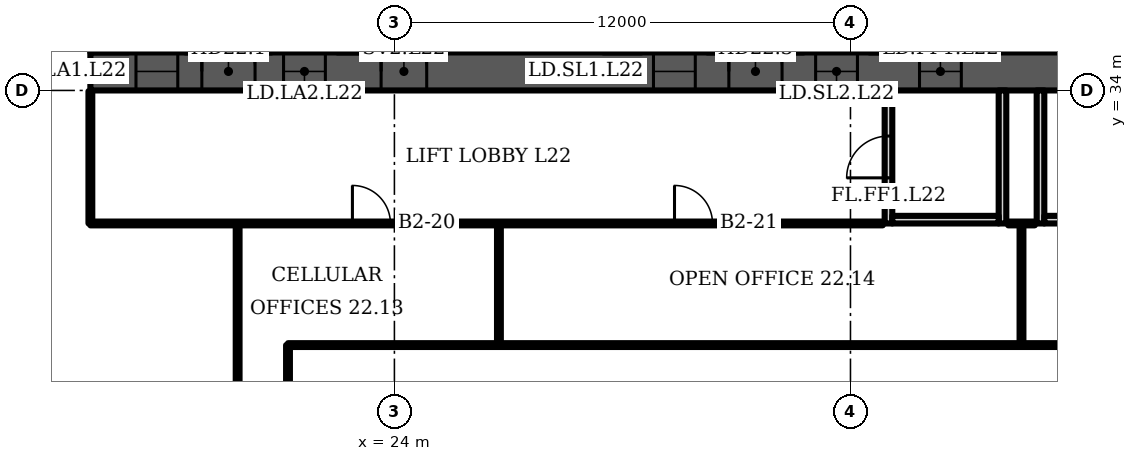
"""IFC4 building model, lengths in metres.
Left out: names, types, materials, properties, quantities, classifications, styles, units other than length and angle.
Written with IfcOpenShell. Run it as: python <this file> out.ifc"""

import sys

from ifc_helpers import new_model, si_unit, direction, frame, frame_2d, origin, place, context, subcontext, project, spatial, rectangle, extrude, element, fill, save


model = new_model("IFC4")
c1 = context("Model", 3, precision=1e-05, world=origin(), true_north=direction((0.0, 1.0)))
c2 = subcontext(c1, "Body", "Model", "MODEL_VIEW")
j1 = project(units=[si_unit("LENGTHUNIT", "METRE"), si_unit("PLANEANGLEUNIT", "RADIAN")], contexts=[c1])
p1 = place(None, origin())
s1 = spatial("IfcSite", under=j1, at=p1, CompositionType="ELEMENT")
p2 = place(p1, origin())
s2 = spatial("IfcBuilding", under=s1, at=p2, CompositionType="ELEMENT")
p3 = place(p2, frame((0.0, 0.0, 100.3)))
s3 = spatial("IfcBuildingStorey", under=s2, at=p3, CompositionType="ELEMENT", Elevation=100.3)
p4 = place(p3, frame((16.0, 34.5, 0.0), z_axis=(0.0, 0.0, 1.0), x_axis=(1.0, 0.0, 0.0)))
e1 = element("IfcWall", 1, at=p4, inside=s3, PredefinedType="SHEAR", context=c2, shape_type="SweptSolid", body=[
    extrude(rectangle(XDim=49.0, YDim=1.0, at=frame_2d((24.5, 0.0))), origin(), (0.0, 0.0, 1.0), 3.6),
])
p5 = place(p4, frame((1.2, 0.0, 0.0)))
e2 = element("IfcOpeningElement", 2, at=p5, cuts=e1, PredefinedType="OPENING", context=c2, shape_type="SweptSolid", body=[
    extrude(rectangle(XDim=1.1, YDim=2.1, at=frame_2d((0.55, 1.05))), frame((0.0, 0.51, 0.0), z_axis=(0.0, -1.0, 0.0), x_axis=(1.0, 0.0, 0.0)), (0.0, 0.0, 1.0), 1.02),
])
p6 = place(p4, frame((5.083, 0.0, 0.0)))
e3 = element("IfcOpeningElement", 3, at=p6, cuts=e1, PredefinedType="OPENING", context=c2, shape_type="SweptSolid", body=[
    extrude(rectangle(XDim=1.1, YDim=2.1, at=frame_2d((0.55, 1.05))), frame((0.0, 0.51, 0.0), z_axis=(0.0, -1.0, 0.0), x_axis=(1.0, 0.0, 0.0)), (0.0, 0.0, 1.0), 1.02),
])
p7 = place(p4, frame((2.933, 0.0, 0.0)))
e4 = element("IfcOpeningElement", 4, at=p7, cuts=e1, PredefinedType="OPENING", context=c2, shape_type="SweptSolid", body=[
    extrude(rectangle(XDim=1.4, YDim=2.1, at=frame_2d((0.7, 1.05))), frame((0.0, 0.51, 0.0), z_axis=(0.0, -1.0, 0.0), x_axis=(1.0, 0.0, 0.0)), (0.0, 0.0, 1.0), 1.02),
])
p8 = place(p4, frame((7.65, 0.0, 0.0)))
e5 = element("IfcOpeningElement", 5, at=p8, cuts=e1, PredefinedType="OPENING", context=c2, shape_type="SweptSolid", body=[
    extrude(rectangle(XDim=1.2, YDim=2.1, at=frame_2d((0.6, 1.05))), frame((0.0, 0.51, 0.0), z_axis=(0.0, -1.0, 0.0), x_axis=(1.0, 0.0, 0.0)), (0.0, 0.0, 1.0), 1.02),
])
p9 = place(p4, frame((14.817, 0.0, 0.0)))
e6 = element("IfcOpeningElement", 6, at=p9, cuts=e1, PredefinedType="OPENING", context=c2, shape_type="SweptSolid", body=[
    extrude(rectangle(XDim=1.1, YDim=2.1, at=frame_2d((0.55, 1.05))), frame((0.0, 0.51, 0.0), z_axis=(0.0, -1.0, 0.0), x_axis=(1.0, 0.0, 0.0)), (0.0, 0.0, 1.0), 1.02),
])
p10 = place(p4, frame((19.083, 0.0, 0.0)))
e7 = element("IfcOpeningElement", 7, at=p10, cuts=e1, PredefinedType="OPENING", context=c2, shape_type="SweptSolid", body=[
    extrude(rectangle(XDim=1.1, YDim=2.1, at=frame_2d((0.55, 1.05))), frame((0.0, 0.51, 0.0), z_axis=(0.0, -1.0, 0.0), x_axis=(1.0, 0.0, 0.0)), (0.0, 0.0, 1.0), 1.02),
])
p11 = place(p4, frame((16.8, 0.0, 0.0)))
e8 = element("IfcOpeningElement", 8, at=p11, cuts=e1, PredefinedType="OPENING", context=c2, shape_type="SweptSolid", body=[
    extrude(rectangle(XDim=1.4, YDim=2.1, at=frame_2d((0.7, 1.05))), frame((0.0, 0.51, 0.0), z_axis=(0.0, -1.0, 0.0), x_axis=(1.0, 0.0, 0.0)), (0.0, 0.0, 1.0), 1.02),
])
p12 = place(p4, frame((21.817, 0.0, 0.0)))
e9 = element("IfcOpeningElement", 9, at=p12, cuts=e1, PredefinedType="OPENING", context=c2, shape_type="SweptSolid", body=[
    extrude(rectangle(XDim=1.1, YDim=2.1, at=frame_2d((0.55, 1.05))), frame((0.0, 0.51, 0.0), z_axis=(0.0, -1.0, 0.0), x_axis=(1.0, 0.0, 0.0)), (0.0, 0.0, 1.0), 1.02),
])
p13 = place(p4, frame((26.083, 0.0, 0.0)))
e10 = element("IfcOpeningElement", 10, at=p13, cuts=e1, PredefinedType="OPENING", context=c2, shape_type="SweptSolid", body=[
    extrude(rectangle(XDim=1.1, YDim=2.1, at=frame_2d((0.55, 1.05))), frame((0.0, 0.51, 0.0), z_axis=(0.0, -1.0, 0.0), x_axis=(1.0, 0.0, 0.0)), (0.0, 0.0, 1.0), 1.02),
])
p14 = place(p4, frame((33.15, 0.0, 0.0)))
e11 = element("IfcOpeningElement", 11, at=p14, cuts=e1, PredefinedType="OPENING", context=c2, shape_type="SweptSolid", body=[
    extrude(rectangle(XDim=1.2, YDim=2.1, at=frame_2d((0.6, 1.05))), frame((0.0, 0.51, 0.0), z_axis=(0.0, -1.0, 0.0), x_axis=(1.0, 0.0, 0.0)), (0.0, 0.0, 1.0), 1.02),
])
p15 = place(p4, frame((37.8, 0.0, 0.0)))
e12 = element("IfcOpeningElement", 12, at=p15, cuts=e1, PredefinedType="OPENING", context=c2, shape_type="SweptSolid", body=[
    extrude(rectangle(XDim=1.4, YDim=2.1, at=frame_2d((0.7, 1.05))), frame((0.0, 0.51, 0.0), z_axis=(0.0, -1.0, 0.0), x_axis=(1.0, 0.0, 0.0)), (0.0, 0.0, 1.0), 1.02),
])
p16 = place(p4, frame((42.817, 0.0, 0.0)))
e13 = element("IfcOpeningElement", 13, at=p16, cuts=e1, PredefinedType="OPENING", context=c2, shape_type="SweptSolid", body=[
    extrude(rectangle(XDim=1.1, YDim=2.1, at=frame_2d((0.55, 1.05))), frame((0.0, 0.51, 0.0), z_axis=(0.0, -1.0, 0.0), x_axis=(1.0, 0.0, 0.0)), (0.0, 0.0, 1.0), 1.02),
])
p17 = place(p4, frame((46.7, 0.0, 0.0)))
e14 = element("IfcOpeningElement", 14, at=p17, cuts=e1, PredefinedType="OPENING", context=c2, shape_type="SweptSolid", body=[
    extrude(rectangle(XDim=1.1, YDim=2.1, at=frame_2d((0.55, 1.05))), frame((0.0, 0.51, 0.0), z_axis=(0.0, -1.0, 0.0), x_axis=(1.0, 0.0, 0.0)), (0.0, 0.0, 1.0), 1.02),
])
p18 = place(p4, frame((44.667, 0.0, 0.0)))
e15 = element("IfcOpeningElement", 15, at=p18, cuts=e1, PredefinedType="OPENING", context=c2, shape_type="SweptSolid", body=[
    extrude(rectangle(XDim=1.4, YDim=2.1, at=frame_2d((0.7, 1.05))), frame((0.0, 0.51, 0.0), z_axis=(0.0, -1.0, 0.0), x_axis=(1.0, 0.0, 0.0)), (0.0, 0.0, 1.0), 1.02),
])
p19 = place(p3, frame((37.0, 30.5, 0.0), z_axis=(0.0, 0.0, 1.0), x_axis=(0.0, 1.0, 0.0)))
e16 = element("IfcWall", 16, at=p19, inside=s3, PredefinedType="PARTITIONING", context=c2, shape_type="SweptSolid", body=[
    extrude(rectangle(XDim=3.5, YDim=0.2, at=frame_2d((1.75, 0.0))), origin(), (0.0, 0.0, 1.0), 3.2),
])
p20 = place(p19, frame((1.2, 0.0, 0.0)))
e17 = element("IfcOpeningElement", 17, at=p20, cuts=e16, PredefinedType="OPENING", context=c2, shape_type="SweptSolid", body=[
    extrude(rectangle(XDim=1.1, YDim=2.1, at=frame_2d((0.55, 1.05))), frame((0.0, 0.11, 0.0), z_axis=(0.0, -1.0, 0.0), x_axis=(1.0, 0.0, 0.0)), (0.0, 0.0, 1.0), 0.22),
])
p21 = place(p3, frame((40.0, 30.5, 0.0), z_axis=(0.0, 0.0, 1.0), x_axis=(0.0, 1.0, 0.0)))
e18 = element("IfcWall", 18, at=p21, inside=s3, PredefinedType="PARTITIONING", context=c2, shape_type="SweptSolid", body=[
    extrude(rectangle(XDim=3.5, YDim=0.2, at=frame_2d((1.75, 0.0))), origin(), (0.0, 0.0, 1.0), 3.2),
])
p22 = place(p3, frame((37.1, 30.6, 0.0), z_axis=(0.0, 0.0, 1.0), x_axis=(1.0, 0.0, 0.0)))
e19 = element("IfcWall", 19, at=p22, inside=s3, PredefinedType="PARTITIONING", context=c2, shape_type="SweptSolid", body=[
    extrude(rectangle(XDim=2.8, YDim=0.2, at=frame_2d((1.4, 0.0))), origin(), (0.0, 0.0, 1.0), 3.2),
])
p23 = place(p3, frame((41.0, 30.5, 0.0), z_axis=(0.0, 0.0, 1.0), x_axis=(0.0, 1.0, 0.0)))
e20 = element("IfcWall", 20, at=p23, inside=s3, PredefinedType="PARTITIONING", context=c2, shape_type="SweptSolid", body=[
    extrude(rectangle(XDim=3.5, YDim=0.2, at=frame_2d((1.75, 0.0))), origin(), (0.0, 0.0, 1.0), 3.2),
])
p24 = place(p3, frame((41.1, 30.6, 0.0), z_axis=(0.0, 0.0, 1.0), x_axis=(1.0, 0.0, 0.0)))
e21 = element("IfcWall", 21, at=p24, inside=s3, PredefinedType="PARTITIONING", context=c2, shape_type="SweptSolid", body=[
    extrude(rectangle(XDim=2.8, YDim=0.2, at=frame_2d((1.4, 0.0))), origin(), (0.0, 0.0, 1.0), 3.2),
])
p25 = place(p3, frame((16.0, 30.5, 0.0), z_axis=(0.0, 0.0, 1.0), x_axis=(0.0, 1.0, 0.0)))
e22 = element("IfcWall", 22, at=p25, inside=s3, PredefinedType="PARTITIONING", context=c2, shape_type="SweptSolid", body=[
    extrude(rectangle(XDim=3.48, YDim=0.1, at=frame_2d((1.74, 0.0))), origin(), (0.0, 0.0, 1.0), 3.2),
])
p26 = place(p3, frame((16.0, 30.5, 0.0), z_axis=(0.0, 0.0, 1.0), x_axis=(1.0, 0.0, 0.0)))
e23 = element("IfcWall", 23, at=p26, inside=s3, PredefinedType="PARTITIONING", context=c2, shape_type="SweptSolid", body=[
    extrude(rectangle(XDim=20.85, YDim=0.1, at=frame_2d((10.425, 0.0))), origin(), (0.0, 0.0, 1.0), 3.2),
])
p27 = place(p26, frame((6.895, 0.0, 0.0)))
e24 = element("IfcOpeningElement", 24, at=p27, cuts=e23, PredefinedType="OPENING", context=c2, shape_type="SweptSolid", body=[
    extrude(rectangle(XDim=1.0, YDim=2.1, at=frame_2d((0.5, 1.05))), frame((0.0, 0.06, 0.0), z_axis=(0.0, -1.0, 0.0), x_axis=(1.0, 0.0, 0.0)), (0.0, 0.0, 1.0), 0.12),
])
p28 = place(p26, frame((15.37, 0.0, 0.0)))
e25 = element("IfcOpeningElement", 25, at=p28, cuts=e23, PredefinedType="OPENING", context=c2, shape_type="SweptSolid", body=[
    extrude(rectangle(XDim=1.0, YDim=2.1, at=frame_2d((0.5, 1.05))), frame((0.0, 0.06, 0.0), z_axis=(0.0, -1.0, 0.0), x_axis=(1.0, 0.0, 0.0)), (0.0, 0.0, 1.0), 0.12),
])
p29 = place(p3, frame((19.875, 23.6, 0.0), z_axis=(0.0, 0.0, 1.0), x_axis=(0.0, 1.0, 0.0)))
e26 = element("IfcWall", 26, at=p29, inside=s3, PredefinedType="PARTITIONING", context=c2, shape_type="SweptSolid", body=[
    extrude(rectangle(XDim=6.9, YDim=0.1, at=frame_2d((3.45, 0.0))), origin(), (0.0, 0.0, 1.0), 3.2),
])
p30 = place(p3, frame((21.2, 23.6, 0.0), z_axis=(0.0, 0.0, 1.0), x_axis=(0.0, 1.0, 0.0)))
e27 = element("IfcWall", 27, at=p30, inside=s3, PredefinedType="PARTITIONING", context=c2, shape_type="SweptSolid", body=[
    extrude(rectangle(XDim=3.7, YDim=0.1, at=frame_2d((1.85, 0.0))), origin(), (0.0, 0.0, 1.0), 3.2),
])
p31 = place(p3, frame((21.2, 27.3, 0.0), z_axis=(0.0, 0.0, 1.0), x_axis=(1.0, 0.0, 0.0)))
e28 = element("IfcWall", 28, at=p31, inside=s3, PredefinedType="PARTITIONING", context=c2, shape_type="SweptSolid", body=[
    extrude(rectangle(XDim=42.4, YDim=0.1, at=frame_2d((21.2, 0.0))), origin(), (0.0, 0.0, 1.0), 3.2),
])
p32 = place(p31, frame((22.275, 0.0, 0.0)))
e29 = element("IfcOpeningElement", 29, at=p32, cuts=e28, PredefinedType="OPENING", context=c2, shape_type="SweptSolid", body=[
    extrude(rectangle(XDim=1.0, YDim=2.1, at=frame_2d((0.5, 1.05))), frame((0.0, 0.06, 0.0), z_axis=(0.0, -1.0, 0.0), x_axis=(1.0, 0.0, 0.0)), (0.0, 0.0, 1.0), 0.12),
])
p33 = place(p31, frame((27.73, 0.0, 0.0)))
e30 = element("IfcOpeningElement", 30, at=p33, cuts=e28, PredefinedType="OPENING", context=c2, shape_type="SweptSolid", body=[
    extrude(rectangle(XDim=1.0, YDim=2.1, at=frame_2d((0.5, 1.05))), frame((0.0, 0.06, 0.0), z_axis=(0.0, -1.0, 0.0), x_axis=(1.0, 0.0, 0.0)), (0.0, 0.0, 1.0), 0.12),
])
p34 = place(p31, frame((31.785, 0.0, 0.0)))
e31 = element("IfcOpeningElement", 31, at=p34, cuts=e28, PredefinedType="OPENING", context=c2, shape_type="SweptSolid", body=[
    extrude(rectangle(XDim=1.0, YDim=2.1, at=frame_2d((0.5, 1.05))), frame((0.0, 0.06, 0.0), z_axis=(0.0, -1.0, 0.0), x_axis=(1.0, 0.0, 0.0)), (0.0, 0.0, 1.0), 0.12),
])
p35 = place(p31, frame((35.845, 0.0, 0.0)))
e32 = element("IfcOpeningElement", 32, at=p35, cuts=e28, PredefinedType="OPENING", context=c2, shape_type="SweptSolid", body=[
    extrude(rectangle(XDim=1.0, YDim=2.1, at=frame_2d((0.5, 1.05))), frame((0.0, 0.06, 0.0), z_axis=(0.0, -1.0, 0.0), x_axis=(1.0, 0.0, 0.0)), (0.0, 0.0, 1.0), 0.12),
])
p36 = place(p31, frame((39.9, 0.0, 0.0)))
e33 = element("IfcOpeningElement", 33, at=p36, cuts=e28, PredefinedType="OPENING", context=c2, shape_type="SweptSolid", body=[
    extrude(rectangle(XDim=1.0, YDim=2.1, at=frame_2d((0.5, 1.05))), frame((0.0, 0.06, 0.0), z_axis=(0.0, -1.0, 0.0), x_axis=(1.0, 0.0, 0.0)), (0.0, 0.0, 1.0), 0.12),
])
for number, where, z_axis, x_axis in (
    (34, (26.75, 27.3, 0.0), (0.0, 0.0, 1.0), (0.0, 1.0, 0.0)),
    (35, (40.5, 27.3, 0.0), (0.0, 0.0, 1.0), (0.0, 1.0, 0.0)),
):
    element("IfcWall", number, at=place(p3, frame(where, z_axis=z_axis, x_axis=x_axis)), inside=s3, PredefinedType="PARTITIONING", context=c2, shape_type="SweptSolid", body=[
        extrude(rectangle(XDim=3.2, YDim=0.1, at=frame_2d((1.6, 0.0))), origin(), (0.0, 0.0, 1.0), 3.2),
    ])
p37 = place(p3, frame((40.15, 30.5, 0.0), z_axis=(0.0, 0.0, 1.0), x_axis=(1.0, 0.0, 0.0)))
e36 = element("IfcWall", 36, at=p37, inside=s3, PredefinedType="PARTITIONING", context=c2, shape_type="SweptSolid", body=[
    extrude(rectangle(XDim=0.7, YDim=0.1, at=frame_2d((0.35, 0.0))), origin(), (0.0, 0.0, 1.0), 3.2),
])
p38 = place(p5, origin())
e37 = element("IfcDoor", 37, at=p38, inside=s3, OperationType="DOUBLE_DOOR_SLIDING", PredefinedType="DOOR", context=c2, shape_type="SweptSolid", body=[
    extrude(rectangle(XDim=1.1, YDim=2.1, at=frame_2d((0.55, 1.05))), frame((0.0, 0.025, 0.0), z_axis=(0.0, -1.0, 0.0), x_axis=(1.0, 0.0, 0.0)), (0.0, 0.0, 1.0), 0.05),
])
fill(e2, e37)
p39 = place(p6, origin())
e38 = element("IfcDoor", 38, at=p39, inside=s3, OperationType="DOUBLE_DOOR_SLIDING", PredefinedType="DOOR", context=c2, shape_type="SweptSolid", body=[
    extrude(rectangle(XDim=1.1, YDim=2.1, at=frame_2d((0.55, 1.05))), frame((0.0, 0.025, 0.0), z_axis=(0.0, -1.0, 0.0), x_axis=(1.0, 0.0, 0.0)), (0.0, 0.0, 1.0), 0.05),
])
fill(e3, e38)
p40 = place(p7, origin())
e39 = element("IfcDoor", 39, at=p40, inside=s3, OperationType="DOUBLE_DOOR_SINGLE_SWING", PredefinedType="DOOR", context=c2, shape_type="SweptSolid", body=[
    extrude(rectangle(XDim=1.4, YDim=2.1, at=frame_2d((0.7, 1.05))), frame((0.0, 0.025, 0.0), z_axis=(0.0, -1.0, 0.0), x_axis=(1.0, 0.0, 0.0)), (0.0, 0.0, 1.0), 0.05),
])
fill(e4, e39)
p41 = place(p8, origin())
e40 = element("IfcDoor", 40, at=p41, inside=s3, OperationType="SINGLE_SWING_LEFT", PredefinedType="DOOR", context=c2, shape_type="SweptSolid", body=[
    extrude(rectangle(XDim=1.2, YDim=2.1, at=frame_2d((0.6, 1.05))), frame((0.0, 0.025, 0.0), z_axis=(0.0, -1.0, 0.0), x_axis=(1.0, 0.0, 0.0)), (0.0, 0.0, 1.0), 0.05),
])
fill(e5, e40)
p42 = place(p9, origin())
e41 = element("IfcDoor", 41, at=p42, inside=s3, OperationType="DOUBLE_DOOR_SLIDING", PredefinedType="DOOR", context=c2, shape_type="SweptSolid", body=[
    extrude(rectangle(XDim=1.1, YDim=2.1, at=frame_2d((0.55, 1.05))), frame((0.0, 0.025, 0.0), z_axis=(0.0, -1.0, 0.0), x_axis=(1.0, 0.0, 0.0)), (0.0, 0.0, 1.0), 0.05),
])
fill(e6, e41)
p43 = place(p10, origin())
e42 = element("IfcDoor", 42, at=p43, inside=s3, OperationType="DOUBLE_DOOR_SLIDING", PredefinedType="DOOR", context=c2, shape_type="SweptSolid", body=[
    extrude(rectangle(XDim=1.1, YDim=2.1, at=frame_2d((0.55, 1.05))), frame((0.0, 0.025, 0.0), z_axis=(0.0, -1.0, 0.0), x_axis=(1.0, 0.0, 0.0)), (0.0, 0.0, 1.0), 0.05),
])
fill(e7, e42)
p44 = place(p11, origin())
e43 = element("IfcDoor", 43, at=p44, inside=s3, OperationType="DOUBLE_DOOR_SINGLE_SWING", PredefinedType="DOOR", context=c2, shape_type="SweptSolid", body=[
    extrude(rectangle(XDim=1.4, YDim=2.1, at=frame_2d((0.7, 1.05))), frame((0.0, 0.025, 0.0), z_axis=(0.0, -1.0, 0.0), x_axis=(1.0, 0.0, 0.0)), (0.0, 0.0, 1.0), 0.05),
])
fill(e8, e43)
p45 = place(p12, origin())
e44 = element("IfcDoor", 44, at=p45, inside=s3, OperationType="DOUBLE_DOOR_SLIDING", PredefinedType="DOOR", context=c2, shape_type="SweptSolid", body=[
    extrude(rectangle(XDim=1.1, YDim=2.1, at=frame_2d((0.55, 1.05))), frame((0.0, 0.025, 0.0), z_axis=(0.0, -1.0, 0.0), x_axis=(1.0, 0.0, 0.0)), (0.0, 0.0, 1.0), 0.05),
])
fill(e9, e44)
p46 = place(p20, origin())
e45 = element("IfcDoor", 45, at=p46, inside=s3, OperationType="SINGLE_SWING_LEFT", PredefinedType="DOOR", context=c2, shape_type="SweptSolid", body=[
    extrude(rectangle(XDim=1.1, YDim=2.1, at=frame_2d((0.55, 1.05))), frame((0.0, 0.025, 0.0), z_axis=(0.0, -1.0, 0.0), x_axis=(1.0, 0.0, 0.0)), (0.0, 0.0, 1.0), 0.05),
])
fill(e17, e45)
p47 = place(p27, origin())
e46 = element("IfcDoor", 46, at=p47, inside=s3, OperationType="SINGLE_SWING_LEFT", PredefinedType="DOOR", context=c2, shape_type="SweptSolid", body=[
    extrude(rectangle(XDim=1.0, YDim=2.1, at=frame_2d((0.5, 1.05))), frame((0.0, 0.025, 0.0), z_axis=(0.0, -1.0, 0.0), x_axis=(1.0, 0.0, 0.0)), (0.0, 0.0, 1.0), 0.05),
])
fill(e24, e46)
p48 = place(p28, origin())
e47 = element("IfcDoor", 47, at=p48, inside=s3, OperationType="SINGLE_SWING_LEFT", PredefinedType="DOOR", context=c2, shape_type="SweptSolid", body=[
    extrude(rectangle(XDim=1.0, YDim=2.1, at=frame_2d((0.5, 1.05))), frame((0.0, 0.025, 0.0), z_axis=(0.0, -1.0, 0.0), x_axis=(1.0, 0.0, 0.0)), (0.0, 0.0, 1.0), 0.05),
])
fill(e25, e47)
save(model, sys.argv[1])
